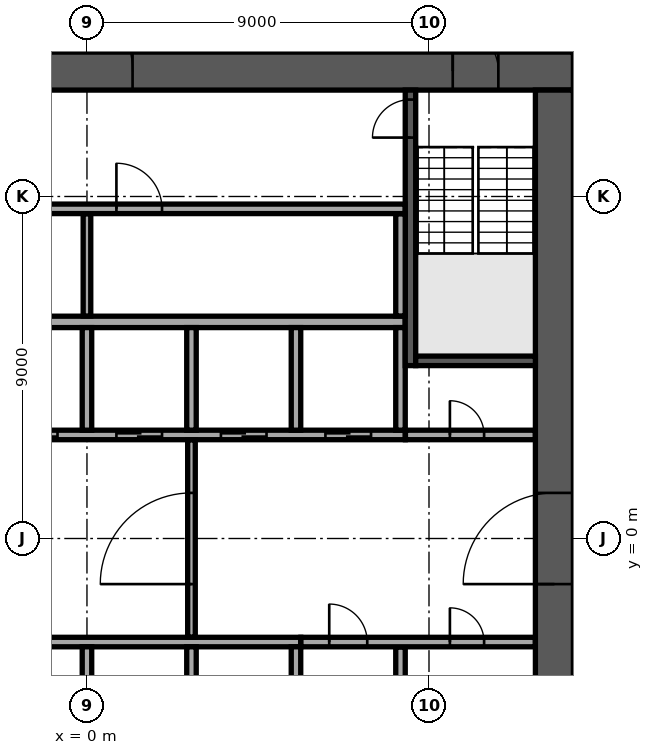
"""IFC4 building model, lengths in metres.
Left out: names, types, materials, properties, quantities, classifications, styles, units other than length and angle.
Written with IfcOpenShell. Run it as: python <this file> out.ifc"""

import sys

from ifc_helpers import new_model, si_unit, direction, frame, frame_2d, origin, place, context, subcontext, project, spatial, rectangle, extrude, element, fill, save


model = new_model("IFC4")
c1 = context("Model", 3, precision=1e-05, world=origin(), true_north=direction((0.0, 1.0)))
c2 = subcontext(c1, "Body", "Model", "MODEL_VIEW")
j1 = project(units=[si_unit("LENGTHUNIT", "METRE"), si_unit("PLANEANGLEUNIT", "RADIAN")], contexts=[c1])
p1 = place(None, origin())
s1 = spatial("IfcSite", under=j1, at=p1, CompositionType="ELEMENT")
p2 = place(p1, origin())
s2 = spatial("IfcBuilding", under=s1, at=p2, CompositionType="ELEMENT")
p3 = place(p2, frame((0.0, 0.0, 139.7)))
s3 = spatial("IfcBuildingStorey", under=s2, at=p3, CompositionType="ELEMENT", Elevation=139.7)
p4 = place(p3, frame((-12.8, 12.3, 0.0), z_axis=(0.0, 0.0, 1.0), x_axis=(1.0, 0.0, 0.0)))
e1 = element("IfcWall", 1, at=p4, inside=s3, PredefinedType="SHEAR", context=c2, shape_type="SweptSolid", body=[
    extrude(rectangle(XDim=25.6, YDim=1.0, at=frame_2d((12.8, 0.0))), origin(), (0.0, 0.0, 1.0), 3.6),
])
p5 = place(p4, frame((11.6, 0.0, 0.0)))
e2 = element("IfcOpeningElement", 2, at=p5, cuts=e1, PredefinedType="OPENING", context=c2, shape_type="SweptSolid", body=[
    extrude(rectangle(XDim=2.4, YDim=2.4, at=frame_2d((1.2, 1.2))), frame((0.0, 0.51, 0.0), z_axis=(0.0, -1.0, 0.0), x_axis=(1.0, 0.0, 0.0)), (0.0, 0.0, 1.0), 1.02),
])
p6 = place(p4, frame((22.425, 0.0, 0.0)))
e3 = element("IfcOpeningElement", 3, at=p6, cuts=e1, PredefinedType="OPENING", context=c2, shape_type="SweptSolid", body=[
    extrude(rectangle(XDim=1.2, YDim=2.1, at=frame_2d((0.6, 1.05))), frame((0.0, 0.51, 0.0), z_axis=(0.0, -1.0, 0.0), x_axis=(1.0, 0.0, 0.0)), (0.0, 0.0, 1.0), 1.02),
])
p7 = place(p4, frame((1.4, 0.0, 0.0)))
e4 = element("IfcOpeningElement", 4, at=p7, cuts=e1, PredefinedType="OPENING", context=c2, shape_type="SweptSolid", body=[
    extrude(rectangle(XDim=1.0, YDim=2.1, at=frame_2d((0.5, 1.05))), frame((0.0, 0.51, 0.0), z_axis=(0.0, -1.0, 0.0), x_axis=(1.0, 0.0, 0.0)), (0.0, 0.0, 1.0), 1.02),
])
p8 = place(p3, frame((12.3, -11.8, 0.0), z_axis=(0.0, 0.0, 1.0), x_axis=(0.0, 1.0, 0.0)))
e5 = element("IfcWall", 5, at=p8, inside=s3, PredefinedType="SHEAR", context=c2, shape_type="SweptSolid", body=[
    extrude(rectangle(XDim=23.6, YDim=1.0, at=frame_2d((11.8, 0.0))), origin(), (0.0, 0.0, 1.0), 3.6),
])
p9 = place(p8, frame((10.6, 0.0, 0.0)))
e6 = element("IfcOpeningElement", 6, at=p9, cuts=e5, PredefinedType="OPENING", context=c2, shape_type="SweptSolid", body=[
    extrude(rectangle(XDim=2.4, YDim=2.4, at=frame_2d((1.2, 1.2))), frame((0.0, 0.51, 0.0), z_axis=(0.0, -1.0, 0.0), x_axis=(1.0, 0.0, 0.0)), (0.0, 0.0, 1.0), 1.02),
])
p10 = place(p3, frame((-8.375, 5.7, 0.0), z_axis=(0.0, 0.0, 1.0), x_axis=(1.0, 0.0, 0.0)))
e7 = element("IfcWall", 7, at=p10, inside=s3, PredefinedType="SOLIDWALL", context=c2, shape_type="SweptSolid", body=[
    extrude(rectangle(XDim=16.75, YDim=0.3, at=frame_2d((8.375, 0.0))), origin(), (0.0, 0.0, 1.0), 3.6),
])
p11 = place(p3, frame((-8.375, 2.725, 0.0), z_axis=(0.0, 0.0, 1.0), x_axis=(1.0, 0.0, 0.0)))
e8 = element("IfcWall", 8, at=p11, inside=s3, PredefinedType="SOLIDWALL", context=c2, shape_type="SweptSolid", body=[
    extrude(rectangle(XDim=16.75, YDim=0.25, at=frame_2d((8.375, 0.0))), origin(), (0.0, 0.0, 1.0), 3.6),
])
p12 = place(p11, frame((0.9, 0.0, 0.0)))
e9 = element("IfcOpeningElement", 9, at=p12, cuts=e8, PredefinedType="OPENING", context=c2, shape_type="SweptSolid", body=[
    extrude(rectangle(XDim=1.2, YDim=2.1, at=frame_2d((0.6, 1.05))), frame((0.0, 0.135, 0.0), z_axis=(0.0, -1.0, 0.0), x_axis=(1.0, 0.0, 0.0)), (0.0, 0.0, 1.0), 0.27),
])
p13 = place(p11, frame((3.65, 0.0, 0.0)))
e10 = element("IfcOpeningElement", 10, at=p13, cuts=e8, PredefinedType="OPENING", context=c2, shape_type="SweptSolid", body=[
    extrude(rectangle(XDim=1.2, YDim=2.1, at=frame_2d((0.6, 1.05))), frame((0.0, 0.135, 0.0), z_axis=(0.0, -1.0, 0.0), x_axis=(1.0, 0.0, 0.0)), (0.0, 0.0, 1.0), 0.27),
])
p14 = place(p11, frame((6.4, 0.0, 0.0)))
e11 = element("IfcOpeningElement", 11, at=p14, cuts=e8, PredefinedType="OPENING", context=c2, shape_type="SweptSolid", body=[
    extrude(rectangle(XDim=1.2, YDim=2.1, at=frame_2d((0.6, 1.05))), frame((0.0, 0.135, 0.0), z_axis=(0.0, -1.0, 0.0), x_axis=(1.0, 0.0, 0.0)), (0.0, 0.0, 1.0), 0.27),
])
p15 = place(p11, frame((9.15, 0.0, 0.0)))
e12 = element("IfcOpeningElement", 12, at=p15, cuts=e8, PredefinedType="OPENING", context=c2, shape_type="SweptSolid", body=[
    extrude(rectangle(XDim=1.2, YDim=2.1, at=frame_2d((0.6, 1.05))), frame((0.0, 0.135, 0.0), z_axis=(0.0, -1.0, 0.0), x_axis=(1.0, 0.0, 0.0)), (0.0, 0.0, 1.0), 0.27),
])
p16 = place(p11, frame((11.9, 0.0, 0.0)))
e13 = element("IfcOpeningElement", 13, at=p16, cuts=e8, PredefinedType="OPENING", context=c2, shape_type="SweptSolid", body=[
    extrude(rectangle(XDim=1.2, YDim=2.1, at=frame_2d((0.6, 1.05))), frame((0.0, 0.135, 0.0), z_axis=(0.0, -1.0, 0.0), x_axis=(1.0, 0.0, 0.0)), (0.0, 0.0, 1.0), 0.27),
])
p17 = place(p11, frame((14.65, 0.0, 0.0)))
e14 = element("IfcOpeningElement", 14, at=p17, cuts=e8, PredefinedType="OPENING", context=c2, shape_type="SweptSolid", body=[
    extrude(rectangle(XDim=1.2, YDim=2.1, at=frame_2d((0.6, 1.05))), frame((0.0, 0.135, 0.0), z_axis=(0.0, -1.0, 0.0), x_axis=(1.0, 0.0, 0.0)), (0.0, 0.0, 1.0), 0.27),
])
for number, where, z_axis, x_axis in (
    (15, (0.0, 2.85, 0.0), (0.0, 0.0, 1.0), (0.0, 1.0, 0.0)),
    (16, (2.75, 2.85, 0.0), (0.0, 0.0, 1.0), (0.0, 1.0, 0.0)),
    (17, (5.5, 2.85, 0.0), (0.0, 0.0, 1.0), (0.0, 1.0, 0.0)),
    (18, (8.25, 2.85, 0.0), (0.0, 0.0, 1.0), (0.0, 1.0, 0.0)),
):
    element("IfcWall", number, at=place(p3, frame(where, z_axis=z_axis, x_axis=x_axis)), inside=s3, PredefinedType="SOLIDWALL", context=c2, shape_type="SweptSolid", body=[
        extrude(rectangle(XDim=2.7, YDim=0.25, at=frame_2d((1.35, 0.0))), origin(), (0.0, 0.0, 1.0), 3.6),
    ])
p18 = place(p3, frame((-2.875, -2.725, 0.0), z_axis=(0.0, 0.0, 1.0), x_axis=(1.0, 0.0, 0.0)))
e19 = element("IfcWall", 19, at=p18, inside=s3, PredefinedType="SOLIDWALL", context=c2, shape_type="SweptSolid", body=[
    extrude(rectangle(XDim=8.5, YDim=0.25, at=frame_2d((4.25, 0.0))), origin(), (0.0, 0.0, 1.0), 3.6),
])
for number, where, z_axis, x_axis in (
    (20, (0.0, -5.55, 0.0), (0.0, 0.0, 1.0), (0.0, 1.0, 0.0)),
    (21, (2.75, -5.55, 0.0), (0.0, 0.0, 1.0), (0.0, 1.0, 0.0)),
    (22, (5.5, -5.55, 0.0), (0.0, 0.0, 1.0), (0.0, 1.0, 0.0)),
):
    element("IfcWall", number, at=place(p3, frame(where, z_axis=z_axis, x_axis=x_axis)), inside=s3, PredefinedType="SOLIDWALL", context=c2, shape_type="SweptSolid", body=[
        extrude(rectangle(XDim=2.7, YDim=0.25, at=frame_2d((1.35, 0.0))), origin(), (0.0, 0.0, 1.0), 3.6),
    ])
p19 = place(p3, frame((8.512, 4.55, 0.0), z_axis=(0.0, 0.0, 1.0), x_axis=(0.0, 1.0, 0.0)))
e23 = element("IfcWall", 23, at=p19, inside=s3, PredefinedType="SOLIDWALL", context=c2, shape_type="SweptSolid", body=[
    extrude(rectangle(XDim=7.25, YDim=0.275, at=frame_2d((3.625, 0.0))), origin(), (0.0, 0.0, 1.0), 3.6),
])
p20 = place(p19, frame((6.0, 0.0, 0.0)))
e24 = element("IfcOpeningElement", 24, at=p20, cuts=e23, PredefinedType="OPENING", context=c2, shape_type="SweptSolid", body=[
    extrude(rectangle(XDim=1.0, YDim=2.1, at=frame_2d((0.5, 1.05))), frame((0.0, 0.147, 0.0), z_axis=(0.0, -1.0, 0.0), x_axis=(1.0, 0.0, 0.0)), (0.0, 0.0, 1.0), 0.295),
])
p21 = place(p3, frame((8.65, 4.675, 0.0), z_axis=(0.0, 0.0, 1.0), x_axis=(1.0, 0.0, 0.0)))
e25 = element("IfcWall", 25, at=p21, inside=s3, PredefinedType="SOLIDWALL", context=c2, shape_type="SweptSolid", body=[
    extrude(rectangle(XDim=3.15, YDim=0.25, at=frame_2d((1.575, 0.0))), origin(), (0.0, 0.0, 1.0), 3.6),
])
p22 = place(p3, frame((8.25, -5.545, 0.0), z_axis=(0.0, 0.0, 1.0), x_axis=(0.0, 1.0, 0.0)))
e26 = element("IfcWall", 26, at=p22, inside=s3, PredefinedType="PARTITIONING", context=c2, shape_type="SweptSolid", body=[
    extrude(rectangle(XDim=2.69, YDim=0.25, at=frame_2d((1.345, 0.0))), origin(), (0.0, 0.0, 1.0), 3.6),
])
p23 = place(p3, frame((5.63, -2.725, 0.0), z_axis=(0.0, 0.0, 1.0), x_axis=(1.0, 0.0, 0.0)))
e27 = element("IfcWall", 27, at=p23, inside=s3, PredefinedType="PARTITIONING", context=c2, shape_type="SweptSolid", body=[
    extrude(rectangle(XDim=6.165, YDim=0.25, at=frame_2d((3.083, 0.0))), origin(), (0.0, 0.0, 1.0), 3.6),
])
p24 = place(p23, frame((0.745, 0.0, 0.0)))
e28 = element("IfcOpeningElement", 28, at=p24, cuts=e27, PredefinedType="OPENING", context=c2, shape_type="SweptSolid", body=[
    extrude(rectangle(XDim=1.0, YDim=2.1, at=frame_2d((0.5, 1.05))), frame((0.0, 0.135, 0.0), z_axis=(0.0, -1.0, 0.0), x_axis=(1.0, 0.0, 0.0)), (0.0, 0.0, 1.0), 0.27),
])
p25 = place(p23, frame((3.92, 0.0, 0.0)))
e29 = element("IfcOpeningElement", 29, at=p25, cuts=e27, PredefinedType="OPENING", context=c2, shape_type="SweptSolid", body=[
    extrude(rectangle(XDim=0.9, YDim=2.1, at=frame_2d((0.45, 1.05))), frame((0.0, 0.135, 0.0), z_axis=(0.0, -1.0, 0.0), x_axis=(1.0, 0.0, 0.0)), (0.0, 0.0, 1.0), 0.27),
])
p26 = place(p3, frame((2.75, -2.595, 0.0), z_axis=(0.0, 0.0, 1.0), x_axis=(0.0, 1.0, 0.0)))
e30 = element("IfcWall", 30, at=p26, inside=s3, PredefinedType="PARTITIONING", context=c2, shape_type="SweptSolid", body=[
    extrude(rectangle(XDim=5.19, YDim=0.2, at=frame_2d((2.595, 0.0))), origin(), (0.0, 0.0, 1.0), 3.6),
])
p27 = place(p26, frame((1.395, 0.0, 0.0)))
e31 = element("IfcOpeningElement", 31, at=p27, cuts=e30, PredefinedType="OPENING", context=c2, shape_type="SweptSolid", body=[
    extrude(rectangle(XDim=2.4, YDim=2.4, at=frame_2d((1.2, 1.2))), frame((0.0, 0.11, 0.0), z_axis=(0.0, -1.0, 0.0), x_axis=(1.0, 0.0, 0.0)), (0.0, 0.0, 1.0), 0.22),
])
p28 = place(p3, frame((8.38, 2.725, 0.0), z_axis=(0.0, 0.0, 1.0), x_axis=(1.0, 0.0, 0.0)))
e32 = element("IfcWall", 32, at=p28, inside=s3, PredefinedType="PARTITIONING", context=c2, shape_type="SweptSolid", body=[
    extrude(rectangle(XDim=3.415, YDim=0.25, at=frame_2d((1.708, 0.0))), origin(), (0.0, 0.0, 1.0), 3.6),
])
p29 = place(p28, frame((1.17, 0.0, 0.0)))
e33 = element("IfcOpeningElement", 33, at=p29, cuts=e32, PredefinedType="OPENING", context=c2, shape_type="SweptSolid", body=[
    extrude(rectangle(XDim=0.9, YDim=2.1, at=frame_2d((0.45, 1.05))), frame((0.0, 0.135, 0.0), z_axis=(0.0, -1.0, 0.0), x_axis=(1.0, 0.0, 0.0)), (0.0, 0.0, 1.0), 0.27),
])
p30 = place(p3, frame((0.0, 5.855, 0.0), z_axis=(0.0, 0.0, 1.0), x_axis=(0.0, 1.0, 0.0)))
e34 = element("IfcWall", 34, at=p30, inside=s3, PredefinedType="PARTITIONING", context=c2, shape_type="SweptSolid", body=[
    extrude(rectangle(XDim=2.69, YDim=0.2, at=frame_2d((1.345, 0.0))), origin(), (0.0, 0.0, 1.0), 3.6),
])
p31 = place(p3, frame((8.25, 5.855, 0.0), z_axis=(0.0, 0.0, 1.0), x_axis=(0.0, 1.0, 0.0)))
e35 = element("IfcWall", 35, at=p31, inside=s3, PredefinedType="PARTITIONING", context=c2, shape_type="SweptSolid", body=[
    extrude(rectangle(XDim=2.69, YDim=0.25, at=frame_2d((1.345, 0.0))), origin(), (0.0, 0.0, 1.0), 3.6),
])
p32 = place(p3, frame((-8.35, 8.675, 0.0), z_axis=(0.0, 0.0, 1.0), x_axis=(1.0, 0.0, 0.0)))
e36 = element("IfcWall", 36, at=p32, inside=s3, PredefinedType="PARTITIONING", context=c2, shape_type="SweptSolid", body=[
    extrude(rectangle(XDim=16.72, YDim=0.25, at=frame_2d((8.36, 0.0))), origin(), (0.0, 0.0, 1.0), 3.6),
])
p33 = place(p32, frame((0.975, 0.0, 0.0)))
e37 = element("IfcOpeningElement", 37, at=p33, cuts=e36, PredefinedType="OPENING", context=c2, shape_type="SweptSolid", body=[
    extrude(rectangle(XDim=1.0, YDim=2.1, at=frame_2d((0.5, 1.05))), frame((0.0, 0.135, 0.0), z_axis=(0.0, -1.0, 0.0), x_axis=(1.0, 0.0, 0.0)), (0.0, 0.0, 1.0), 0.27),
])
p34 = place(p32, frame((3.725, 0.0, 0.0)))
e38 = element("IfcOpeningElement", 38, at=p34, cuts=e36, PredefinedType="OPENING", context=c2, shape_type="SweptSolid", body=[
    extrude(rectangle(XDim=1.0, YDim=2.1, at=frame_2d((0.5, 1.05))), frame((0.0, 0.135, 0.0), z_axis=(0.0, -1.0, 0.0), x_axis=(1.0, 0.0, 0.0)), (0.0, 0.0, 1.0), 0.27),
])
p35 = place(p32, frame((9.125, 0.0, 0.0)))
e39 = element("IfcOpeningElement", 39, at=p35, cuts=e36, PredefinedType="OPENING", context=c2, shape_type="SweptSolid", body=[
    extrude(rectangle(XDim=1.2, YDim=2.1, at=frame_2d((0.6, 1.05))), frame((0.0, 0.135, 0.0), z_axis=(0.0, -1.0, 0.0), x_axis=(1.0, 0.0, 0.0)), (0.0, 0.0, 1.0), 0.27),
])
p36 = place(p3, frame((8.775, 34.705, 0.0), z_axis=(0.0, 0.0, 1.0), x_axis=(-0.874620778241, -0.484807687922, 0.0)))
e40 = element("IfcWall", 40, at=p36, inside=s3, PredefinedType="STANDARD", context=c2, shape_type="SweptSolid", body=[
    extrude(rectangle(XDim=49.376, YDim=0.6, at=frame_2d((24.688, 0.0))), origin(), (0.0, 0.0, 1.0), 3.6),
])
p37 = place(p36, frame((1.2, 0.0, 0.9)))
e41 = element("IfcOpeningElement", 41, at=p37, cuts=e40, PredefinedType="OPENING", context=c2, shape_type="SweptSolid", body=[
    extrude(rectangle(XDim=2.1, YDim=2.1, at=frame_2d((1.05, 1.05))), frame((0.0, 0.31, 0.0), z_axis=(0.0, -1.0, 0.0), x_axis=(1.0, 0.0, 0.0)), (0.0, 0.0, 1.0), 0.62),
])
p38 = place(p36, frame((5.7, 0.0, 0.9)))
e42 = element("IfcOpeningElement", 42, at=p38, cuts=e40, PredefinedType="OPENING", context=c2, shape_type="SweptSolid", body=[
    extrude(rectangle(XDim=2.1, YDim=2.1, at=frame_2d((1.05, 1.05))), frame((0.0, 0.31, 0.0), z_axis=(0.0, -1.0, 0.0), x_axis=(1.0, 0.0, 0.0)), (0.0, 0.0, 1.0), 0.62),
])
p39 = place(p36, frame((14.7, 0.0, 0.9)))
e43 = element("IfcOpeningElement", 43, at=p39, cuts=e40, PredefinedType="OPENING", context=c2, shape_type="SweptSolid", body=[
    extrude(rectangle(XDim=2.1, YDim=2.1, at=frame_2d((1.05, 1.05))), frame((0.0, 0.31, 0.0), z_axis=(0.0, -1.0, 0.0), x_axis=(1.0, 0.0, 0.0)), (0.0, 0.0, 1.0), 0.62),
])
p40 = place(p36, frame((19.2, 0.0, 0.9)))
e44 = element("IfcOpeningElement", 44, at=p40, cuts=e40, PredefinedType="OPENING", context=c2, shape_type="SweptSolid", body=[
    extrude(rectangle(XDim=2.1, YDim=2.1, at=frame_2d((1.05, 1.05))), frame((0.0, 0.31, 0.0), z_axis=(0.0, -1.0, 0.0), x_axis=(1.0, 0.0, 0.0)), (0.0, 0.0, 1.0), 0.62),
])
p41 = place(p36, frame((23.7, 0.0, 0.9)))
e45 = element("IfcOpeningElement", 45, at=p41, cuts=e40, PredefinedType="OPENING", context=c2, shape_type="SweptSolid", body=[
    extrude(rectangle(XDim=2.1, YDim=2.1, at=frame_2d((1.05, 1.05))), frame((0.0, 0.31, 0.0), z_axis=(0.0, -1.0, 0.0), x_axis=(1.0, 0.0, 0.0)), (0.0, 0.0, 1.0), 0.62),
])
p42 = place(p36, frame((28.2, 0.0, 0.9)))
e46 = element("IfcOpeningElement", 46, at=p42, cuts=e40, PredefinedType="OPENING", context=c2, shape_type="SweptSolid", body=[
    extrude(rectangle(XDim=2.1, YDim=2.1, at=frame_2d((1.05, 1.05))), frame((0.0, 0.31, 0.0), z_axis=(0.0, -1.0, 0.0), x_axis=(1.0, 0.0, 0.0)), (0.0, 0.0, 1.0), 0.62),
])
p43 = place(p36, frame((32.7, 0.0, 0.9)))
e47 = element("IfcOpeningElement", 47, at=p43, cuts=e40, PredefinedType="OPENING", context=c2, shape_type="SweptSolid", body=[
    extrude(rectangle(XDim=2.1, YDim=2.1, at=frame_2d((1.05, 1.05))), frame((0.0, 0.31, 0.0), z_axis=(0.0, -1.0, 0.0), x_axis=(1.0, 0.0, 0.0)), (0.0, 0.0, 1.0), 0.62),
])
p44 = place(p36, frame((37.2, 0.0, 0.9)))
e48 = element("IfcOpeningElement", 48, at=p44, cuts=e40, PredefinedType="OPENING", context=c2, shape_type="SweptSolid", body=[
    extrude(rectangle(XDim=2.1, YDim=2.1, at=frame_2d((1.05, 1.05))), frame((0.0, 0.31, 0.0), z_axis=(0.0, -1.0, 0.0), x_axis=(1.0, 0.0, 0.0)), (0.0, 0.0, 1.0), 0.62),
])
p45 = place(p36, frame((41.7, 0.0, 0.9)))
e49 = element("IfcOpeningElement", 49, at=p45, cuts=e40, PredefinedType="OPENING", context=c2, shape_type="SweptSolid", body=[
    extrude(rectangle(XDim=2.1, YDim=2.1, at=frame_2d((1.05, 1.05))), frame((0.0, 0.31, 0.0), z_axis=(0.0, -1.0, 0.0), x_axis=(1.0, 0.0, 0.0)), (0.0, 0.0, 1.0), 0.62),
])
p46 = place(p36, frame((46.138, 0.0, 0.9)))
e50 = element("IfcOpeningElement", 50, at=p46, cuts=e40, PredefinedType="OPENING", context=c2, shape_type="SweptSolid", body=[
    extrude(rectangle(XDim=2.1, YDim=2.1, at=frame_2d((1.05, 1.05))), frame((0.0, 0.31, 0.0), z_axis=(0.0, -1.0, 0.0), x_axis=(1.0, 0.0, 0.0)), (0.0, 0.0, 1.0), 0.62),
])
p47 = place(p3, frame((-23.187, 9.123, 0.0), z_axis=(0.0, 0.0, 1.0), x_axis=(0.874618419846, 0.484811942578, 0.0)))
e51 = element("IfcWall", 51, at=p47, inside=s3, PredefinedType="PARTITIONING", context=c2, shape_type="SweptSolid", body=[
    extrude(rectangle(XDim=31.713, YDim=0.15, at=frame_2d((15.857, 0.0))), origin(), (0.0, 0.0, 1.0), 3.15),
])
p48 = place(p47, frame((11.252, 0.0, 0.0)))
e52 = element("IfcOpeningElement", 52, at=p48, cuts=e51, PredefinedType="OPENING", context=c2, shape_type="SweptSolid", body=[
    extrude(rectangle(XDim=1.0, YDim=2.1, at=frame_2d((0.5, 1.05))), frame((0.0, 0.085, 0.0), z_axis=(0.0, -1.0, 0.0), x_axis=(1.0, 0.0, 0.0)), (0.0, 0.0, 1.0), 0.17),
])
p49 = place(p47, frame((19.896, 0.0, 0.0)))
e53 = element("IfcOpeningElement", 53, at=p49, cuts=e51, PredefinedType="OPENING", context=c2, shape_type="SweptSolid", body=[
    extrude(rectangle(XDim=1.0, YDim=2.1, at=frame_2d((0.5, 1.05))), frame((0.0, 0.085, 0.0), z_axis=(0.0, -1.0, 0.0), x_axis=(1.0, 0.0, 0.0)), (0.0, 0.0, 1.0), 0.17),
])
p50 = place(p47, frame((29.223, 0.0, 0.0)))
e54 = element("IfcOpeningElement", 54, at=p50, cuts=e51, PredefinedType="OPENING", context=c2, shape_type="SweptSolid", body=[
    extrude(rectangle(XDim=1.0, YDim=2.1, at=frame_2d((0.5, 1.05))), frame((0.0, 0.085, 0.0), z_axis=(0.0, -1.0, 0.0), x_axis=(1.0, 0.0, 0.0)), (0.0, 0.0, 1.0), 0.17),
])
p51 = place(p5, origin())
e55 = element("IfcDoor", 55, at=p51, inside=s3, OperationType="SINGLE_SWING_LEFT", PredefinedType="DOOR", context=c2, shape_type="SweptSolid", body=[
    extrude(rectangle(XDim=2.4, YDim=2.4, at=frame_2d((1.2, 1.2))), frame((0.0, 0.025, 0.0), z_axis=(0.0, -1.0, 0.0), x_axis=(1.0, 0.0, 0.0)), (0.0, 0.0, 1.0), 0.05),
])
fill(e2, e55)
p52 = place(p6, origin())
e56 = element("IfcDoor", 56, at=p52, inside=s3, OperationType="SINGLE_SWING_LEFT", PredefinedType="DOOR", context=c2, shape_type="SweptSolid", body=[
    extrude(rectangle(XDim=1.2, YDim=2.1, at=frame_2d((0.6, 1.05))), frame((0.0, 0.025, 0.0), z_axis=(0.0, -1.0, 0.0), x_axis=(1.0, 0.0, 0.0)), (0.0, 0.0, 1.0), 0.05),
])
fill(e3, e56)
p53 = place(p9, origin())
e57 = element("IfcDoor", 57, at=p53, inside=s3, OperationType="SINGLE_SWING_LEFT", PredefinedType="DOOR", context=c2, shape_type="SweptSolid", body=[
    extrude(rectangle(XDim=2.4, YDim=2.4, at=frame_2d((1.2, 1.2))), frame((0.0, 0.025, 0.0), z_axis=(0.0, -1.0, 0.0), x_axis=(1.0, 0.0, 0.0)), (0.0, 0.0, 1.0), 0.05),
])
fill(e6, e57)
p54 = place(p14, origin())
e58 = element("IfcDoor", 58, at=p54, inside=s3, OperationType="DOUBLE_DOOR_SLIDING", PredefinedType="DOOR", context=c2, shape_type="SweptSolid", body=[
    extrude(rectangle(XDim=1.2, YDim=2.1, at=frame_2d((0.6, 1.05))), frame((0.0, 0.025, 0.0), z_axis=(0.0, -1.0, 0.0), x_axis=(1.0, 0.0, 0.0)), (0.0, 0.0, 1.0), 0.05),
])
fill(e11, e58)
p55 = place(p15, origin())
e59 = element("IfcDoor", 59, at=p55, inside=s3, OperationType="DOUBLE_DOOR_SLIDING", PredefinedType="DOOR", context=c2, shape_type="SweptSolid", body=[
    extrude(rectangle(XDim=1.2, YDim=2.1, at=frame_2d((0.6, 1.05))), frame((0.0, 0.025, 0.0), z_axis=(0.0, -1.0, 0.0), x_axis=(1.0, 0.0, 0.0)), (0.0, 0.0, 1.0), 0.05),
])
fill(e12, e59)
p56 = place(p16, origin())
e60 = element("IfcDoor", 60, at=p56, inside=s3, OperationType="DOUBLE_DOOR_SLIDING", PredefinedType="DOOR", context=c2, shape_type="SweptSolid", body=[
    extrude(rectangle(XDim=1.2, YDim=2.1, at=frame_2d((0.6, 1.05))), frame((0.0, 0.025, 0.0), z_axis=(0.0, -1.0, 0.0), x_axis=(1.0, 0.0, 0.0)), (0.0, 0.0, 1.0), 0.05),
])
fill(e13, e60)
p57 = place(p17, origin())
e61 = element("IfcDoor", 61, at=p57, inside=s3, OperationType="DOUBLE_DOOR_SLIDING", PredefinedType="DOOR", context=c2, shape_type="SweptSolid", body=[
    extrude(rectangle(XDim=1.2, YDim=2.1, at=frame_2d((0.6, 1.05))), frame((0.0, 0.025, 0.0), z_axis=(0.0, -1.0, 0.0), x_axis=(1.0, 0.0, 0.0)), (0.0, 0.0, 1.0), 0.05),
])
fill(e14, e61)
p58 = place(p20, origin())
e62 = element("IfcDoor", 62, at=p58, inside=s3, OperationType="SINGLE_SWING_LEFT", PredefinedType="DOOR", context=c2, shape_type="SweptSolid", body=[
    extrude(rectangle(XDim=1.0, YDim=2.1, at=frame_2d((0.5, 1.05))), frame((0.0, 0.025, 0.0), z_axis=(0.0, -1.0, 0.0), x_axis=(1.0, 0.0, 0.0)), (0.0, 0.0, 1.0), 0.05),
])
fill(e24, e62)
p59 = place(p24, origin())
e63 = element("IfcDoor", 63, at=p59, inside=s3, OperationType="SINGLE_SWING_LEFT", PredefinedType="DOOR", context=c2, shape_type="SweptSolid", body=[
    extrude(rectangle(XDim=1.0, YDim=2.1, at=frame_2d((0.5, 1.05))), frame((0.0, 0.025, 0.0), z_axis=(0.0, -1.0, 0.0), x_axis=(1.0, 0.0, 0.0)), (0.0, 0.0, 1.0), 0.05),
])
fill(e28, e63)
p60 = place(p29, origin())
e64 = element("IfcDoor", 64, at=p60, inside=s3, OperationType="SINGLE_SWING_LEFT", PredefinedType="DOOR", context=c2, shape_type="SweptSolid", body=[
    extrude(rectangle(XDim=0.9, YDim=2.1, at=frame_2d((0.45, 1.05))), frame((0.0, 0.025, 0.0), z_axis=(0.0, -1.0, 0.0), x_axis=(1.0, 0.0, 0.0)), (0.0, 0.0, 1.0), 0.05),
])
fill(e33, e64)
p61 = place(p25, origin())
e65 = element("IfcDoor", 65, at=p61, inside=s3, OperationType="SINGLE_SWING_LEFT", PredefinedType="DOOR", context=c2, shape_type="SweptSolid", body=[
    extrude(rectangle(XDim=0.9, YDim=2.1, at=frame_2d((0.45, 1.05))), frame((0.0, 0.025, 0.0), z_axis=(0.0, -1.0, 0.0), x_axis=(1.0, 0.0, 0.0)), (0.0, 0.0, 1.0), 0.05),
])
fill(e29, e65)
p62 = place(p35, origin())
e66 = element("IfcDoor", 66, at=p62, inside=s3, OperationType="SINGLE_SWING_LEFT", PredefinedType="DOOR", context=c2, shape_type="SweptSolid", body=[
    extrude(rectangle(XDim=1.2, YDim=2.1, at=frame_2d((0.6, 1.05))), frame((0.0, 0.025, 0.0), z_axis=(0.0, -1.0, 0.0), x_axis=(1.0, 0.0, 0.0)), (0.0, 0.0, 1.0), 0.05),
])
fill(e39, e66)
p63 = place(p27, origin())
e67 = element("IfcDoor", 67, at=p63, inside=s3, OperationType="SINGLE_SWING_LEFT", PredefinedType="DOOR", context=c2, shape_type="SweptSolid", body=[
    extrude(rectangle(XDim=2.4, YDim=2.4, at=frame_2d((1.2, 1.2))), frame((0.0, 0.025, 0.0), z_axis=(0.0, -1.0, 0.0), x_axis=(1.0, 0.0, 0.0)), (0.0, 0.0, 1.0), 0.05),
])
fill(e31, e67)
save(model, sys.argv[1])
